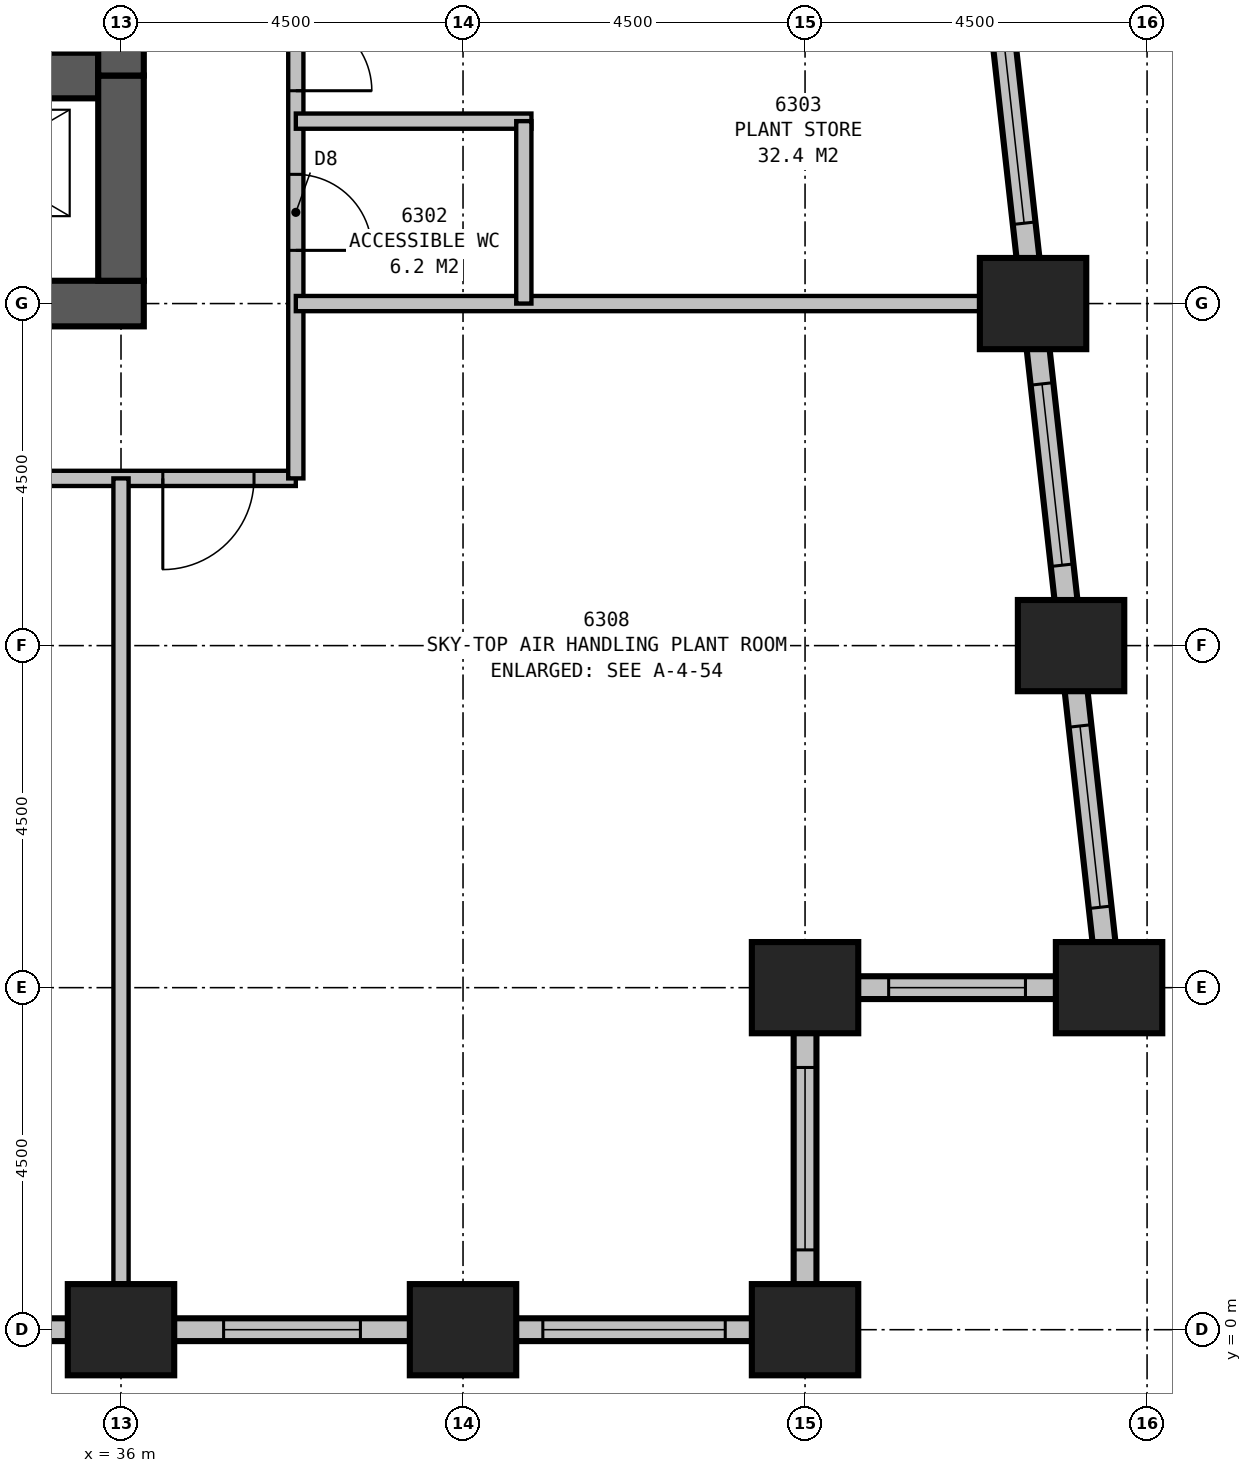
"""IFC4 building model, lengths in metres.
Left out: names, types, materials, properties, quantities, classifications, styles, units other than length and angle.
Written with IfcOpenShell. Run it as: python <this file> out.ifc"""

import sys

from ifc_helpers import new_model, si_unit, direction, frame, frame_2d, origin, origin_2d, place, context, subcontext, project, spatial, rectangle, extrude, element, fill, save


model = new_model("IFC4")
c1 = context("Model", 3, precision=1e-05, world=origin(), true_north=direction((0.0, 1.0)))
c2 = subcontext(c1, "Body", "Model", "MODEL_VIEW")
j1 = project(units=[si_unit("LENGTHUNIT", "METRE"), si_unit("PLANEANGLEUNIT", "RADIAN")], contexts=[c1])
p1 = place(None, origin())
s1 = spatial("IfcSite", under=j1, at=p1, CompositionType="ELEMENT")
p2 = place(p1, origin())
s2 = spatial("IfcBuilding", under=s1, at=p2, CompositionType="ELEMENT")
p3 = place(p2, frame((0.0, 0.0, 244.7)))
s3 = spatial("IfcBuildingStorey", under=s2, at=p3, CompositionType="ELEMENT", Elevation=244.7)
for number, where, z_axis, x_axis in (
    (1, (36.0, 0.0, 0.0), (0.0, 0.0, 1.0), (1.0, 0.0, 0.0)),
    (2, (40.5, 0.0, 0.0), (0.0, 0.0, 1.0), (1.0, 0.0, 0.0)),
    (3, (45.0, 0.0, 0.0), (0.0, 0.0, 1.0), (1.0, 0.0, 0.0)),
    (4, (45.0, 4.5, 0.0), (0.0, 0.0, 1.0), (1.0, 0.0, 0.0)),
    (5, (49.0, 4.5, 0.0), (0.0, 0.0, 1.0), (1.0, 0.0, 0.0)),
    (6, (48.5, 9.0, 0.0), (0.0, 0.0, 1.0), (1.0, 0.0, 0.0)),
    (7, (48.0, 13.5, 0.0), (0.0, 0.0, 1.0), (1.0, 0.0, 0.0)),
):
    element("IfcColumn", number, at=place(p3, frame(where, z_axis=z_axis, x_axis=x_axis)), inside=s3, PredefinedType="COLUMN", context=c2, shape_type="SweptSolid", body=[
        extrude(rectangle(XDim=1.4, YDim=1.2, at=origin_2d()), origin(), (0.0, 0.0, 1.0), 6.0),
    ])
p4 = place(p3, frame((13.2, 13.5, 0.0), z_axis=(0.0, 0.0, 1.0), x_axis=(1.0, 0.0, 0.0)))
e8 = element("IfcWall", 8, at=p4, inside=s3, PredefinedType="SHEAR", context=c2, shape_type="SweptSolid", body=[
    extrude(rectangle(XDim=23.1, YDim=0.6, at=frame_2d((11.55, 0.0))), origin(), (0.0, 0.0, 1.0), 6.0),
])
p5 = place(p3, frame((13.8, 16.5, 0.0), z_axis=(0.0, 0.0, 1.0), x_axis=(1.0, 0.0, 0.0)))
e9 = element("IfcWall", 9, at=p5, inside=s3, PredefinedType="SHEAR", context=c2, shape_type="SweptSolid", body=[
    extrude(rectangle(XDim=21.9, YDim=0.6, at=frame_2d((10.95, 0.0))), origin(), (0.0, 0.0, 1.0), 6.0),
])
p6 = place(p5, frame((5.75, 0.0, 0.0), z_axis=(0.0, 0.0, 1.0), x_axis=(-1.0, 0.0, 0.0)))
e10 = element("IfcOpeningElement", 10, at=p6, cuts=e9, PredefinedType="OPENING", context=c2, shape_type="SweptSolid", body=[
    extrude(rectangle(XDim=1.0, YDim=2.1, at=frame_2d((0.5, 1.05))), frame((0.0, 0.31, 0.0), z_axis=(0.0, -1.0, 0.0), x_axis=(1.0, 0.0, 0.0)), (0.0, 0.0, 1.0), 0.62),
])
p7 = place(p5, frame((10.2, 0.0, 0.0), z_axis=(0.0, 0.0, 1.0), x_axis=(-1.0, 0.0, 0.0)))
e11 = element("IfcOpeningElement", 11, at=p7, cuts=e9, PredefinedType="OPENING", context=c2, shape_type="SweptSolid", body=[
    extrude(rectangle(XDim=1.0, YDim=2.1, at=frame_2d((0.5, 1.05))), frame((0.0, 0.31, 0.0), z_axis=(0.0, -1.0, 0.0), x_axis=(1.0, 0.0, 0.0)), (0.0, 0.0, 1.0), 0.62),
])
p8 = place(p5, frame((12.7, 0.0, 0.0), z_axis=(0.0, 0.0, 1.0), x_axis=(-1.0, 0.0, 0.0)))
e12 = element("IfcOpeningElement", 12, at=p8, cuts=e9, PredefinedType="OPENING", context=c2, shape_type="SweptSolid", body=[
    extrude(rectangle(XDim=1.0, YDim=2.1, at=frame_2d((0.5, 1.05))), frame((0.0, 0.31, 0.0), z_axis=(0.0, -1.0, 0.0), x_axis=(1.0, 0.0, 0.0)), (0.0, 0.0, 1.0), 0.62),
])
p9 = place(p5, frame((17.15, 0.0, 0.0), z_axis=(0.0, 0.0, 1.0), x_axis=(-1.0, 0.0, 0.0)))
e13 = element("IfcOpeningElement", 13, at=p9, cuts=e9, PredefinedType="OPENING", context=c2, shape_type="SweptSolid", body=[
    extrude(rectangle(XDim=1.0, YDim=2.1, at=frame_2d((0.5, 1.05))), frame((0.0, 0.31, 0.0), z_axis=(0.0, -1.0, 0.0), x_axis=(1.0, 0.0, 0.0)), (0.0, 0.0, 1.0), 0.62),
])
p10 = place(p5, frame((0.6, 0.0, 0.0)))
e14 = element("IfcOpeningElement", 14, at=p10, cuts=e9, PredefinedType="OPENING", context=c2, shape_type="SweptSolid", body=[
    extrude(rectangle(XDim=1.2, YDim=2.1, at=frame_2d((0.6, 1.05))), frame((0.0, 0.31, 0.0), z_axis=(0.0, -1.0, 0.0), x_axis=(1.0, 0.0, 0.0)), (0.0, 0.0, 1.0), 0.62),
])
p11 = place(p5, frame((19.6, 0.0, 0.0)))
e15 = element("IfcOpeningElement", 15, at=p11, cuts=e9, PredefinedType="OPENING", context=c2, shape_type="SweptSolid", body=[
    extrude(rectangle(XDim=1.2, YDim=2.1, at=frame_2d((0.6, 1.05))), frame((0.0, 0.31, 0.0), z_axis=(0.0, -1.0, 0.0), x_axis=(1.0, 0.0, 0.0)), (0.0, 0.0, 1.0), 0.62),
])
p12 = place(p3, frame((36.0, 13.8, 0.0), z_axis=(0.0, 0.0, 1.0), x_axis=(0.0, 1.0, 0.0)))
e16 = element("IfcWall", 16, at=p12, inside=s3, PredefinedType="SHEAR", context=c2, shape_type="SweptSolid", body=[
    extrude(rectangle(XDim=2.7, YDim=0.6, at=frame_2d((1.35, 0.0))), origin(), (0.0, 0.0, 1.0), 6.0),
])
p13 = place(p3, frame((36.0, 16.5, 0.0), z_axis=(0.0, 0.0, 1.0), x_axis=(0.0, 1.0, 0.0)))
e17 = element("IfcWall", 17, at=p13, inside=s3, PredefinedType="SHEAR", context=c2, shape_type="SweptSolid", body=[
    extrude(rectangle(XDim=3.5, YDim=0.6, at=frame_2d((1.75, 0.0))), origin(), (0.0, 0.0, 1.0), 6.0),
])
p14 = place(p13, frame((0.65, 0.0, 0.0)))
e18 = element("IfcOpeningElement", 18, at=p14, cuts=e17, PredefinedType="OPENING", context=c2, shape_type="SweptSolid", body=[
    extrude(rectangle(XDim=1.2, YDim=2.1, at=frame_2d((0.6, 1.05))), frame((0.0, 0.31, 0.0), z_axis=(0.0, -1.0, 0.0), x_axis=(1.0, 0.0, 0.0)), (0.0, 0.0, 1.0), 0.62),
])
p15 = place(p3, frame((26.85, 0.0, 0.0), z_axis=(0.0, 0.0, 1.0), x_axis=(1.0, 0.0, 0.0)))
e19 = element("IfcWall", 19, at=p15, inside=s3, PredefinedType="STANDARD", context=c2, shape_type="SweptSolid", body=[
    extrude(rectangle(XDim=18.3, YDim=0.3, at=frame_2d((9.15, 0.0))), origin(), (0.0, 0.0, 1.0), 4.45),
])
p16 = place(p15, frame((1.5, 0.0, 0.5)))
e20 = element("IfcOpeningElement", 20, at=p16, cuts=e19, PredefinedType="OPENING", context=c2, shape_type="SweptSolid", body=[
    extrude(rectangle(XDim=1.8, YDim=2.0, at=frame_2d((0.9, 1.0))), frame((0.0, 0.16, 0.0), z_axis=(0.0, -1.0, 0.0), x_axis=(1.0, 0.0, 0.0)), (0.0, 0.0, 1.0), 0.32),
])
p17 = place(p15, frame((6.0, 0.0, 0.5)))
e21 = element("IfcOpeningElement", 21, at=p17, cuts=e19, PredefinedType="OPENING", context=c2, shape_type="SweptSolid", body=[
    extrude(rectangle(XDim=1.8, YDim=2.0, at=frame_2d((0.9, 1.0))), frame((0.0, 0.16, 0.0), z_axis=(0.0, -1.0, 0.0), x_axis=(1.0, 0.0, 0.0)), (0.0, 0.0, 1.0), 0.32),
])
p18 = place(p15, frame((10.5, 0.0, 0.5)))
e22 = element("IfcOpeningElement", 22, at=p18, cuts=e19, PredefinedType="OPENING", context=c2, shape_type="SweptSolid", body=[
    extrude(rectangle(XDim=1.8, YDim=2.0, at=frame_2d((0.9, 1.0))), frame((0.0, 0.16, 0.0), z_axis=(0.0, -1.0, 0.0), x_axis=(1.0, 0.0, 0.0)), (0.0, 0.0, 1.0), 0.32),
])
p19 = place(p15, frame((14.7, 0.0, 0.5)))
e23 = element("IfcOpeningElement", 23, at=p19, cuts=e19, PredefinedType="OPENING", context=c2, shape_type="SweptSolid", body=[
    extrude(rectangle(XDim=2.4, YDim=2.0, at=frame_2d((1.2, 1.0))), frame((0.0, 0.16, 0.0), z_axis=(0.0, -1.0, 0.0), x_axis=(1.0, 0.0, 0.0)), (0.0, 0.0, 1.0), 0.32),
])
p20 = place(p3, frame((45.0, -0.15, 0.0), z_axis=(0.0, 0.0, 1.0), x_axis=(0.0, 1.0, 0.0)))
e24 = element("IfcWall", 24, at=p20, inside=s3, PredefinedType="STANDARD", context=c2, shape_type="SweptSolid", body=[
    extrude(rectangle(XDim=4.8, YDim=0.3, at=frame_2d((2.4, 0.0))), origin(), (0.0, 0.0, 1.0), 4.45),
])
p21 = place(p20, frame((1.2, 0.0, 0.5)))
e25 = element("IfcOpeningElement", 25, at=p21, cuts=e24, PredefinedType="OPENING", context=c2, shape_type="SweptSolid", body=[
    extrude(rectangle(XDim=2.4, YDim=2.0, at=frame_2d((1.2, 1.0))), frame((0.0, 0.16, 0.0), z_axis=(0.0, -1.0, 0.0), x_axis=(1.0, 0.0, 0.0)), (0.0, 0.0, 1.0), 0.32),
])
p22 = place(p3, frame((44.85, 4.5, 0.0), z_axis=(0.0, 0.0, 1.0), x_axis=(1.0, 0.0, 0.0)))
e26 = element("IfcWall", 26, at=p22, inside=s3, PredefinedType="STANDARD", context=c2, shape_type="SweptSolid", body=[
    extrude(rectangle(XDim=4.3, YDim=0.3, at=frame_2d((2.15, 0.0))), origin(), (0.0, 0.0, 1.0), 4.45),
])
p23 = place(p22, frame((1.25, 0.0, 0.5)))
e27 = element("IfcOpeningElement", 27, at=p23, cuts=e26, PredefinedType="OPENING", context=c2, shape_type="SweptSolid", body=[
    extrude(rectangle(XDim=1.8, YDim=2.0, at=frame_2d((0.9, 1.0))), frame((0.0, 0.16, 0.0), z_axis=(0.0, -1.0, 0.0), x_axis=(1.0, 0.0, 0.0)), (0.0, 0.0, 1.0), 0.32),
])
p24 = place(p3, frame((49.017, 4.351, 0.0), z_axis=(0.0, 0.0, 1.0), x_axis=(-0.110433201132, 0.993883548555, 0.0)))
e28 = element("IfcWall", 28, at=p24, inside=s3, PredefinedType="STANDARD", context=c2, shape_type="SweptSolid", body=[
    extrude(rectangle(XDim=31.994, YDim=0.3, at=frame_2d((15.997, 0.0))), origin(), (0.0, 0.0, 1.0), 4.45),
])
p25 = place(p24, frame((1.214, 0.0, 0.5)))
e29 = element("IfcOpeningElement", 29, at=p25, cuts=e28, PredefinedType="OPENING", context=c2, shape_type="SweptSolid", body=[
    extrude(rectangle(XDim=2.4, YDim=2.0, at=frame_2d((1.2, 1.0))), frame((0.0, 0.16, 0.0), z_axis=(0.0, -1.0, 0.0), x_axis=(1.0, 0.0, 0.0)), (0.0, 0.0, 1.0), 0.32),
])
p26 = place(p24, frame((5.742, 0.0, 0.5)))
e30 = element("IfcOpeningElement", 30, at=p26, cuts=e28, PredefinedType="OPENING", context=c2, shape_type="SweptSolid", body=[
    extrude(rectangle(XDim=2.4, YDim=2.0, at=frame_2d((1.2, 1.0))), frame((0.0, 0.16, 0.0), z_axis=(0.0, -1.0, 0.0), x_axis=(1.0, 0.0, 0.0)), (0.0, 0.0, 1.0), 0.32),
])
p27 = place(p24, frame((10.269, 0.0, 0.5)))
e31 = element("IfcOpeningElement", 31, at=p27, cuts=e28, PredefinedType="OPENING", context=c2, shape_type="SweptSolid", body=[
    extrude(rectangle(XDim=2.4, YDim=2.0, at=frame_2d((1.2, 1.0))), frame((0.0, 0.16, 0.0), z_axis=(0.0, -1.0, 0.0), x_axis=(1.0, 0.0, 0.0)), (0.0, 0.0, 1.0), 0.32),
])
p28 = place(p24, frame((14.797, 0.0, 0.5)))
e32 = element("IfcOpeningElement", 32, at=p28, cuts=e28, PredefinedType="OPENING", context=c2, shape_type="SweptSolid", body=[
    extrude(rectangle(XDim=2.4, YDim=2.0, at=frame_2d((1.2, 1.0))), frame((0.0, 0.16, 0.0), z_axis=(0.0, -1.0, 0.0), x_axis=(1.0, 0.0, 0.0)), (0.0, 0.0, 1.0), 0.32),
])
p29 = place(p24, frame((19.325, 0.0, 0.5)))
e33 = element("IfcOpeningElement", 33, at=p29, cuts=e28, PredefinedType="OPENING", context=c2, shape_type="SweptSolid", body=[
    extrude(rectangle(XDim=2.4, YDim=2.0, at=frame_2d((1.2, 1.0))), frame((0.0, 0.16, 0.0), z_axis=(0.0, -1.0, 0.0), x_axis=(1.0, 0.0, 0.0)), (0.0, 0.0, 1.0), 0.32),
])
p30 = place(p24, frame((23.852, 0.0, 0.5)))
e34 = element("IfcOpeningElement", 34, at=p30, cuts=e28, PredefinedType="OPENING", context=c2, shape_type="SweptSolid", body=[
    extrude(rectangle(XDim=2.4, YDim=2.0, at=frame_2d((1.2, 1.0))), frame((0.0, 0.16, 0.0), z_axis=(0.0, -1.0, 0.0), x_axis=(1.0, 0.0, 0.0)), (0.0, 0.0, 1.0), 0.32),
])
p31 = place(p24, frame((28.38, 0.0, 0.5)))
e35 = element("IfcOpeningElement", 35, at=p31, cuts=e28, PredefinedType="OPENING", context=c2, shape_type="SweptSolid", body=[
    extrude(rectangle(XDim=2.4, YDim=2.0, at=frame_2d((1.2, 1.0))), frame((0.0, 0.16, 0.0), z_axis=(0.0, -1.0, 0.0), x_axis=(1.0, 0.0, 0.0)), (0.0, 0.0, 1.0), 0.32),
])
p32 = place(p3, frame((27.0, 11.2, 0.0), z_axis=(0.0, 0.0, 1.0), x_axis=(1.0, 0.0, 0.0)))
e36 = element("IfcWall", 36, at=p32, inside=s3, PredefinedType="PARTITIONING", context=c2, shape_type="SweptSolid", body=[
    extrude(rectangle(XDim=11.3, YDim=0.2, at=frame_2d((5.65, 0.0))), origin(), (0.0, 0.0, 1.0), 5.75),
])
p33 = place(p32, frame((2.25, 0.0, 0.0), z_axis=(0.0, 0.0, 1.0), x_axis=(-1.0, 0.0, 0.0)))
e37 = element("IfcOpeningElement", 37, at=p33, cuts=e36, PredefinedType="OPENING", context=c2, shape_type="SweptSolid", body=[
    extrude(rectangle(XDim=1.8, YDim=2.4, at=frame_2d((0.9, 1.2))), frame((0.0, 0.11, 0.0), z_axis=(0.0, -1.0, 0.0), x_axis=(1.0, 0.0, 0.0)), (0.0, 0.0, 1.0), 0.22),
])
p34 = place(p32, frame((10.75, 0.0, 0.0), z_axis=(0.0, 0.0, 1.0), x_axis=(-1.0, 0.0, 0.0)))
e38 = element("IfcOpeningElement", 38, at=p34, cuts=e36, PredefinedType="OPENING", context=c2, shape_type="SweptSolid", body=[
    extrude(rectangle(XDim=1.2, YDim=2.1, at=frame_2d((0.6, 1.05))), frame((0.0, 0.11, 0.0), z_axis=(0.0, -1.0, 0.0), x_axis=(1.0, 0.0, 0.0)), (0.0, 0.0, 1.0), 0.22),
])
p35 = place(p3, frame((38.3, 11.2, 0.0), z_axis=(0.0, 0.0, 1.0), x_axis=(0.0, 1.0, 0.0)))
e39 = element("IfcWall", 39, at=p35, inside=s3, PredefinedType="PARTITIONING", context=c2, shape_type="SweptSolid", body=[
    extrude(rectangle(XDim=18.1, YDim=0.2, at=frame_2d((9.05, 0.0))), origin(), (0.0, 0.0, 1.0), 5.75),
])
p36 = place(p35, frame((4.0, 0.0, 0.0), z_axis=(0.0, 0.0, 1.0), x_axis=(-1.0, 0.0, 0.0)))
e40 = element("IfcOpeningElement", 40, at=p36, cuts=e39, PredefinedType="OPENING", context=c2, shape_type="SweptSolid", body=[
    extrude(rectangle(XDim=1.0, YDim=2.1, at=frame_2d((0.5, 1.05))), frame((0.0, 0.11, 0.0), z_axis=(0.0, -1.0, 0.0), x_axis=(1.0, 0.0, 0.0)), (0.0, 0.0, 1.0), 0.22),
])
p37 = place(p35, frame((6.1, 0.0, 0.0), z_axis=(0.0, 0.0, 1.0), x_axis=(-1.0, 0.0, 0.0)))
e41 = element("IfcOpeningElement", 41, at=p37, cuts=e39, PredefinedType="OPENING", context=c2, shape_type="SweptSolid", body=[
    extrude(rectangle(XDim=1.0, YDim=2.1, at=frame_2d((0.5, 1.05))), frame((0.0, 0.11, 0.0), z_axis=(0.0, -1.0, 0.0), x_axis=(1.0, 0.0, 0.0)), (0.0, 0.0, 1.0), 0.22),
])
p38 = place(p35, frame((8.45, 0.0, 0.0), z_axis=(0.0, 0.0, 1.0), x_axis=(-1.0, 0.0, 0.0)))
e42 = element("IfcOpeningElement", 42, at=p38, cuts=e39, PredefinedType="OPENING", context=c2, shape_type="SweptSolid", body=[
    extrude(rectangle(XDim=1.2, YDim=2.1, at=frame_2d((0.6, 1.05))), frame((0.0, 0.11, 0.0), z_axis=(0.0, -1.0, 0.0), x_axis=(1.0, 0.0, 0.0)), (0.0, 0.0, 1.0), 0.22),
])
p39 = place(p3, frame((36.0, 11.2, 0.0), z_axis=(0.0, 0.0, 1.0), x_axis=(0.0, -1.0, 0.0)))
e43 = element("IfcWall", 43, at=p39, inside=s3, PredefinedType="PARTITIONING", context=c2, shape_type="SweptSolid", body=[
    extrude(rectangle(XDim=10.59, YDim=0.2, at=frame_2d((5.295, 0.0))), origin(), (0.0, 0.0, 1.0), 2.15),
])
p40 = place(p3, frame((38.3, 13.5, 0.0), z_axis=(0.0, 0.0, 1.0), x_axis=(1.0, 0.0, 0.0)))
e44 = element("IfcWall", 44, at=p40, inside=s3, PredefinedType="PARTITIONING", context=c2, shape_type="SweptSolid", body=[
    extrude(rectangle(XDim=8.999, YDim=0.2, at=frame_2d((4.5, 0.0))), origin(), (0.0, 0.0, 1.0), 4.45),
])
p41 = place(p3, frame((38.3, 15.9, 0.0), z_axis=(0.0, 0.0, 1.0), x_axis=(1.0, 0.0, 0.0)))
e45 = element("IfcWall", 45, at=p41, inside=s3, PredefinedType="PARTITIONING", context=c2, shape_type="SweptSolid", body=[
    extrude(rectangle(XDim=3.1, YDim=0.2, at=frame_2d((1.55, 0.0))), origin(), (0.0, 0.0, 1.0), 5.75),
])
p42 = place(p3, frame((41.3, 13.5, 0.0), z_axis=(0.0, 0.0, 1.0), x_axis=(0.0, 1.0, 0.0)))
e46 = element("IfcWall", 46, at=p42, inside=s3, PredefinedType="PARTITIONING", context=c2, shape_type="SweptSolid", body=[
    extrude(rectangle(XDim=2.4, YDim=0.2, at=frame_2d((1.2, 0.0))), origin(), (0.0, 0.0, 1.0), 5.75),
])
p43 = place(p18, origin())
e47 = element("IfcWindow", 47, at=p43, inside=s3, PartitioningType="SINGLE_PANEL", PredefinedType="USERDEFINED", context=c2, shape_type="SweptSolid", body=[
    extrude(rectangle(XDim=1.8, YDim=2.0, at=frame_2d((0.9, 1.0))), frame((0.0, 0.03, 0.0), z_axis=(0.0, -1.0, 0.0), x_axis=(1.0, 0.0, 0.0)), (0.0, 0.0, 1.0), 0.06),
])
fill(e22, e47)
p44 = place(p19, origin())
e48 = element("IfcWindow", 48, at=p44, inside=s3, PartitioningType="SINGLE_PANEL", PredefinedType="USERDEFINED", context=c2, shape_type="SweptSolid", body=[
    extrude(rectangle(XDim=2.4, YDim=2.0, at=frame_2d((1.2, 1.0))), frame((0.0, 0.03, 0.0), z_axis=(0.0, -1.0, 0.0), x_axis=(1.0, 0.0, 0.0)), (0.0, 0.0, 1.0), 0.06),
])
fill(e23, e48)
p45 = place(p21, origin())
e49 = element("IfcWindow", 49, at=p45, inside=s3, PartitioningType="SINGLE_PANEL", PredefinedType="USERDEFINED", context=c2, shape_type="SweptSolid", body=[
    extrude(rectangle(XDim=2.4, YDim=2.0, at=frame_2d((1.2, 1.0))), frame((0.0, 0.03, 0.0), z_axis=(0.0, -1.0, 0.0), x_axis=(1.0, 0.0, 0.0)), (0.0, 0.0, 1.0), 0.06),
])
fill(e25, e49)
p46 = place(p23, origin())
e50 = element("IfcWindow", 50, at=p46, inside=s3, PartitioningType="SINGLE_PANEL", PredefinedType="USERDEFINED", context=c2, shape_type="SweptSolid", body=[
    extrude(rectangle(XDim=1.8, YDim=2.0, at=frame_2d((0.9, 1.0))), frame((0.0, 0.03, 0.0), z_axis=(0.0, -1.0, 0.0), x_axis=(1.0, 0.0, 0.0)), (0.0, 0.0, 1.0), 0.06),
])
fill(e27, e50)
p47 = place(p25, origin())
e51 = element("IfcWindow", 51, at=p47, inside=s3, PartitioningType="SINGLE_PANEL", PredefinedType="USERDEFINED", context=c2, shape_type="SweptSolid", body=[
    extrude(rectangle(XDim=2.4, YDim=2.0, at=frame_2d((1.2, 1.0))), frame((0.0, 0.03, 0.0), z_axis=(0.0, -1.0, 0.0), x_axis=(1.0, 0.0, 0.0)), (0.0, 0.0, 1.0), 0.06),
])
fill(e29, e51)
p48 = place(p26, origin())
e52 = element("IfcWindow", 52, at=p48, inside=s3, PartitioningType="SINGLE_PANEL", PredefinedType="USERDEFINED", context=c2, shape_type="SweptSolid", body=[
    extrude(rectangle(XDim=2.4, YDim=2.0, at=frame_2d((1.2, 1.0))), frame((0.0, 0.03, 0.0), z_axis=(0.0, -1.0, 0.0), x_axis=(1.0, 0.0, 0.0)), (0.0, 0.0, 1.0), 0.06),
])
fill(e30, e52)
p49 = place(p27, origin())
e53 = element("IfcWindow", 53, at=p49, inside=s3, PartitioningType="SINGLE_PANEL", PredefinedType="USERDEFINED", context=c2, shape_type="SweptSolid", body=[
    extrude(rectangle(XDim=2.4, YDim=2.0, at=frame_2d((1.2, 1.0))), frame((0.0, 0.03, 0.0), z_axis=(0.0, -1.0, 0.0), x_axis=(1.0, 0.0, 0.0)), (0.0, 0.0, 1.0), 0.06),
])
fill(e31, e53)
p50 = place(p34, origin())
e54 = element("IfcDoor", 54, at=p50, inside=s3, OperationType="SINGLE_SWING_RIGHT", PredefinedType="DOOR", context=c2, shape_type="SweptSolid", body=[
    extrude(rectangle(XDim=1.2, YDim=2.1, at=frame_2d((0.6, 1.05))), frame((0.0, 0.025, 0.0), z_axis=(0.0, -1.0, 0.0), x_axis=(1.0, 0.0, 0.0)), (0.0, 0.0, 1.0), 0.05),
])
fill(e38, e54)
p51 = place(p36, origin())
e55 = element("IfcDoor", 55, at=p51, inside=s3, OperationType="SINGLE_SWING_RIGHT", PredefinedType="DOOR", context=c2, shape_type="SweptSolid", body=[
    extrude(rectangle(XDim=1.0, YDim=2.1, at=frame_2d((0.5, 1.05))), frame((0.0, 0.025, 0.0), z_axis=(0.0, -1.0, 0.0), x_axis=(1.0, 0.0, 0.0)), (0.0, 0.0, 1.0), 0.05),
])
fill(e40, e55)
p52 = place(p37, origin())
e56 = element("IfcDoor", 56, at=p52, inside=s3, OperationType="SINGLE_SWING_RIGHT", PredefinedType="DOOR", context=c2, shape_type="SweptSolid", body=[
    extrude(rectangle(XDim=1.0, YDim=2.1, at=frame_2d((0.5, 1.05))), frame((0.0, 0.025, 0.0), z_axis=(0.0, -1.0, 0.0), x_axis=(1.0, 0.0, 0.0)), (0.0, 0.0, 1.0), 0.05),
])
fill(e41, e56)
save(model, sys.argv[1])
